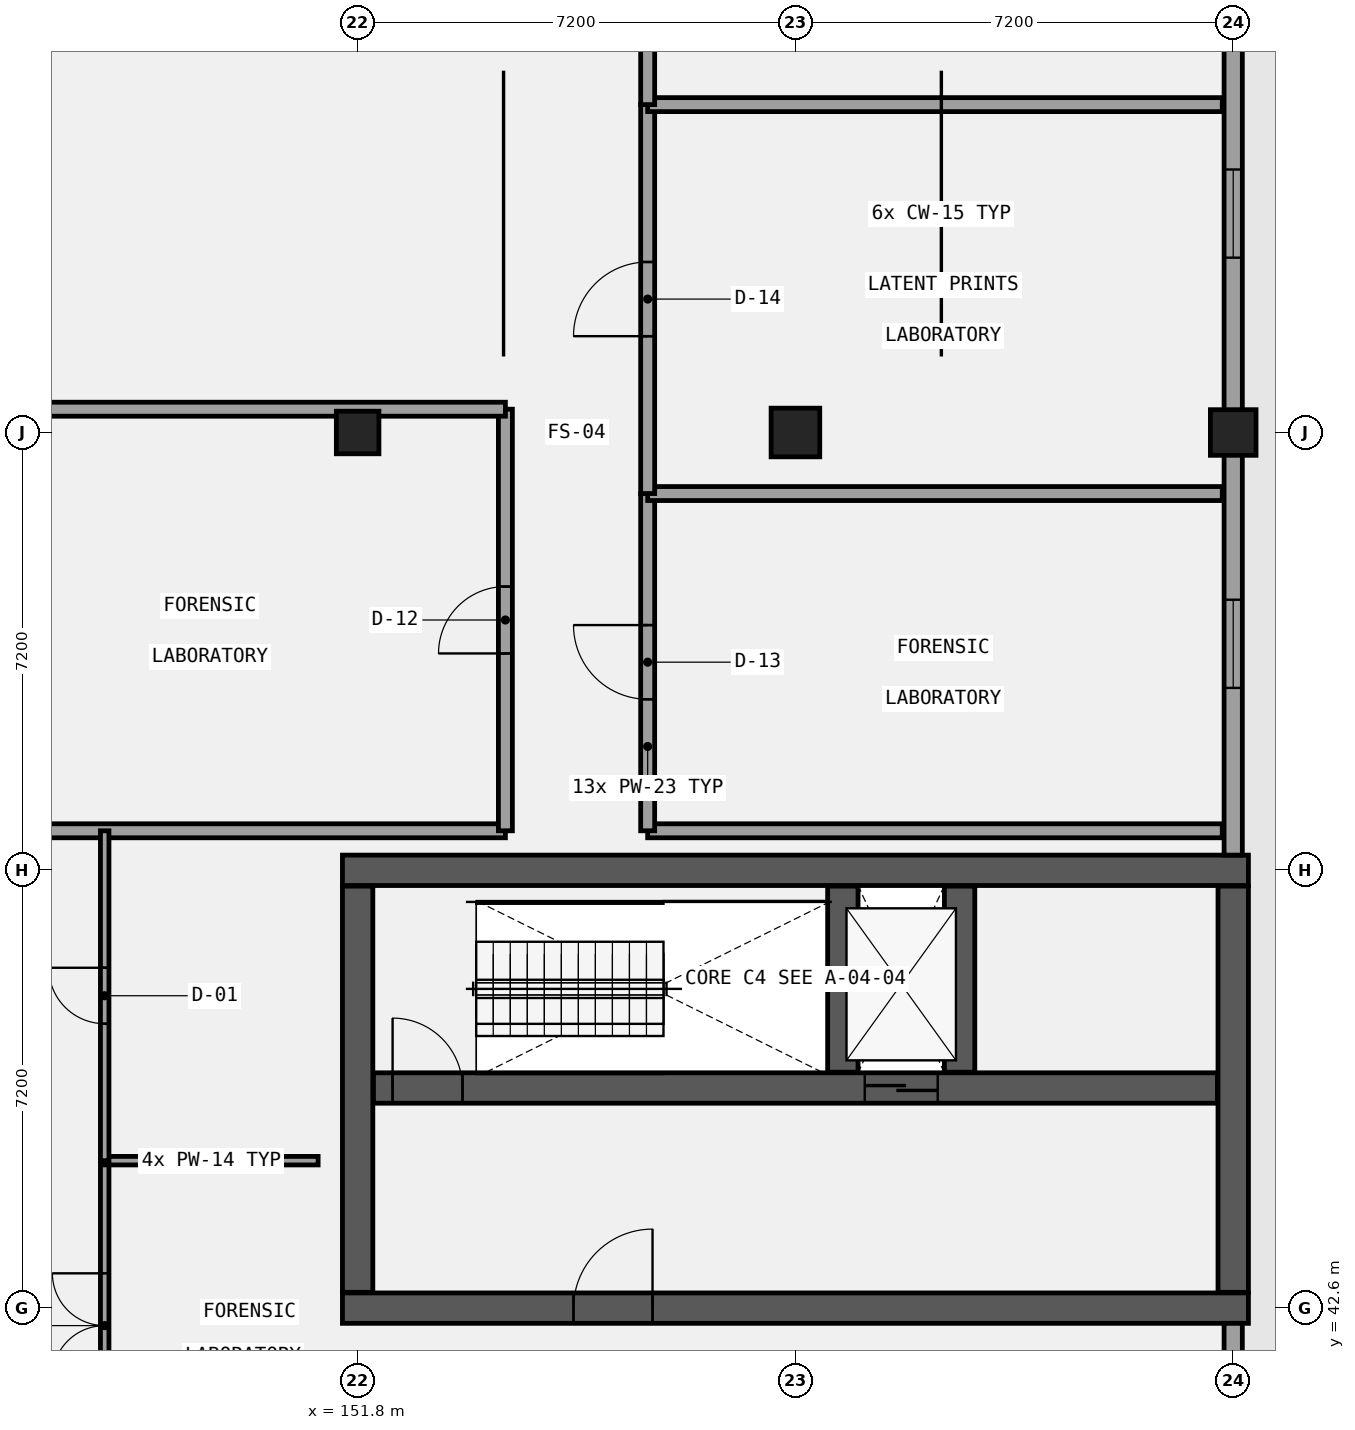
"""IFC4 building model, lengths in metres.
Left out: names, types, materials, properties, quantities, classifications, styles, units other than length and angle.
Written with IfcOpenShell. Run it as: python <this file> out.ifc"""

import sys

from ifc_helpers import new_model, si_unit, direction, frame, frame_2d, origin, origin_2d, place, context, subcontext, project, spatial, rectangle, extrude, element, fill, save


model = new_model("IFC4")
c1 = context("Model", 3, precision=1e-05, world=origin(), true_north=direction((0.0, 1.0)))
c2 = subcontext(c1, "Body", "Model", "MODEL_VIEW")
j1 = project(units=[si_unit("LENGTHUNIT", "METRE"), si_unit("PLANEANGLEUNIT", "RADIAN")], contexts=[c1])
p1 = place(None, origin())
s1 = spatial("IfcSite", under=j1, at=p1, CompositionType="ELEMENT")
p2 = place(p1, origin())
s2 = spatial("IfcBuilding", under=s1, at=p2, CompositionType="ELEMENT")
p3 = place(p2, frame((0.0, 0.0, 5.4)))
s3 = spatial("IfcBuildingStorey", under=s2, at=p3, CompositionType="ELEMENT", Elevation=5.4)
p4 = place(p3, frame((151.55, 49.8, 0.0), z_axis=(0.0, 0.0, 1.0), x_axis=(1.0, 0.0, 0.0)))
e1 = element("IfcWall", 1, at=p4, inside=s3, PredefinedType="SHEAR", context=c2, shape_type="SweptSolid", body=[
    extrude(rectangle(XDim=14.9, YDim=0.5, at=frame_2d((7.45, 0.0))), origin(), (0.0, 0.0, 1.0), 4.2),
])
p5 = place(p3, frame((151.55, 42.6, 0.0), z_axis=(0.0, 0.0, 1.0), x_axis=(1.0, 0.0, 0.0)))
e2 = element("IfcWall", 2, at=p5, inside=s3, PredefinedType="SHEAR", context=c2, shape_type="SweptSolid", body=[
    extrude(rectangle(XDim=14.9, YDim=0.5, at=frame_2d((7.45, 0.0))), origin(), (0.0, 0.0, 1.0), 4.2),
])
p6 = place(p5, frame((3.8, 0.0, 0.0)))
e3 = element("IfcOpeningElement", 3, at=p6, cuts=e2, PredefinedType="OPENING", context=c2, shape_type="SweptSolid", body=[
    extrude(rectangle(XDim=1.3, YDim=2.2, at=frame_2d((0.65, 1.1))), frame((0.0, 0.26, 0.0), z_axis=(0.0, -1.0, 0.0), x_axis=(1.0, 0.0, 0.0)), (0.0, 0.0, 1.0), 0.52),
])
for number, where, z_axis, x_axis in (
    (4, (151.8, 42.86, 0.0), (0.0, 0.0, 1.0), (0.0, 1.0, 0.0)),
    (5, (166.2, 42.86, 0.0), (0.0, 0.0, 1.0), (0.0, 1.0, 0.0)),
):
    element("IfcWall", number, at=place(p3, frame(where, z_axis=z_axis, x_axis=x_axis)), inside=s3, PredefinedType="SHEAR", context=c2, shape_type="SweptSolid", body=[
        extrude(rectangle(XDim=6.68, YDim=0.5, at=frame_2d((3.34, 0.0))), origin(), (0.0, 0.0, 1.0), 4.2),
    ])
p7 = place(p3, frame((152.06, 46.22, 0.0), z_axis=(0.0, 0.0, 1.0), x_axis=(1.0, 0.0, 0.0)))
e6 = element("IfcWall", 6, at=p7, inside=s3, PredefinedType="SHEAR", context=c2, shape_type="SweptSolid", body=[
    extrude(rectangle(XDim=13.88, YDim=0.5, at=frame_2d((6.94, 0.0))), origin(), (0.0, 0.0, 1.0), 4.2),
])
p8 = place(p7, frame((8.08, 0.0, 0.0)))
e7 = element("IfcOpeningElement", 7, at=p8, cuts=e6, PredefinedType="OPENING", context=c2, shape_type="SweptSolid", body=[
    extrude(rectangle(XDim=1.2, YDim=2.15, at=frame_2d((0.6, 1.075))), frame((0.0, 0.26, 0.0), z_axis=(0.0, -1.0, 0.0), x_axis=(1.0, 0.0, 0.0)), (0.0, 0.0, 1.0), 0.52),
])
p9 = place(p7, frame((0.315, 0.0, 0.0)))
e8 = element("IfcOpeningElement", 8, at=p9, cuts=e6, PredefinedType="OPENING", context=c2, shape_type="SweptSolid", body=[
    extrude(rectangle(XDim=1.15, YDim=2.15, at=frame_2d((0.575, 1.075))), frame((0.0, 0.26, 0.0), z_axis=(0.0, -1.0, 0.0), x_axis=(1.0, 0.0, 0.0)), (0.0, 0.0, 1.0), 0.52),
])
for number, where, z_axis, x_axis in (
    (9, (159.78, 46.48, 0.0), (0.0, 0.0, 1.0), (0.0, 1.0, 0.0)),
    (10, (161.7, 46.48, 0.0), (0.0, 0.0, 1.0), (0.0, 1.0, 0.0)),
):
    element("IfcWall", number, at=place(p3, frame(where, z_axis=z_axis, x_axis=x_axis)), inside=s3, PredefinedType="SHEAR", context=c2, shape_type="SweptSolid", body=[
        extrude(rectangle(XDim=3.06, YDim=0.5, at=frame_2d((1.53, 0.0))), origin(), (0.0, 0.0, 1.0), 4.2),
    ])
p10 = place(p3, frame((151.8, 57.0, 0.0), z_axis=(0.0, 0.0, 1.0), x_axis=(1.0, 0.0, 0.0)))
e11 = element("IfcColumn", 11, at=p10, inside=s3, PredefinedType="COLUMN", context=c2, shape_type="SweptSolid", body=[
    extrude(rectangle(XDim=0.7, YDim=0.7, at=origin_2d()), origin(), (0.0, 0.0, 1.0), 4.2),
])
p11 = place(p3, frame((159.0, 57.0, 0.0), z_axis=(0.0, 0.0, 1.0), x_axis=(1.0, 0.0, 0.0)))
e12 = element("IfcColumn", 12, at=p11, inside=s3, PredefinedType="COLUMN", context=c2, shape_type="SweptSolid", body=[
    extrude(rectangle(XDim=0.8, YDim=0.8, at=origin_2d()), origin(), (0.0, 0.0, 1.0), 4.2),
])
p12 = place(p3, frame((166.2, 57.0, 0.0), z_axis=(0.0, 0.0, 1.0), x_axis=(1.0, 0.0, 0.0)))
e13 = element("IfcColumn", 13, at=p12, inside=s3, PredefinedType="COLUMN", context=c2, shape_type="SweptSolid", body=[
    extrude(rectangle(XDim=0.75, YDim=0.75, at=origin_2d()), origin(), (0.0, 0.0, 1.0), 4.2),
])
p13 = place(p3, frame((166.2, 21.15, 0.0), z_axis=(0.0, 0.0, 1.0), x_axis=(0.0, 1.0, 0.0)))
e14 = element("IfcWall", 14, at=p13, inside=s3, PredefinedType="SOLIDWALL", context=c2, shape_type="SweptSolid", body=[
    extrude(rectangle(XDim=21.2, YDim=0.3, at=frame_2d((10.6, 0.0))), origin(), (0.0, 0.0, 1.0), 3.02),
])
p14 = place(p13, frame((2.625, 0.0, 1.0)))
e15 = element("IfcOpeningElement", 15, at=p14, cuts=e14, PredefinedType="OPENING", context=c2, shape_type="SweptSolid", body=[
    extrude(rectangle(XDim=1.8, YDim=1.65, at=frame_2d((0.9, 0.825))), frame((0.0, 0.16, 0.0), z_axis=(0.0, -1.0, 0.0), x_axis=(1.0, 0.0, 0.0)), (0.0, 0.0, 1.0), 0.32),
])
p15 = place(p13, frame((9.75, 0.0, 1.0)))
e16 = element("IfcOpeningElement", 16, at=p15, cuts=e14, PredefinedType="OPENING", context=c2, shape_type="SweptSolid", body=[
    extrude(rectangle(XDim=1.8, YDim=1.65, at=frame_2d((0.9, 0.825))), frame((0.0, 0.16, 0.0), z_axis=(0.0, -1.0, 0.0), x_axis=(1.0, 0.0, 0.0)), (0.0, 0.0, 1.0), 0.32),
])
p16 = place(p13, frame((16.825, 0.0, 1.0)))
e17 = element("IfcOpeningElement", 17, at=p16, cuts=e14, PredefinedType="OPENING", context=c2, shape_type="SweptSolid", body=[
    extrude(rectangle(XDim=1.8, YDim=1.65, at=frame_2d((0.9, 0.825))), frame((0.0, 0.16, 0.0), z_axis=(0.0, -1.0, 0.0), x_axis=(1.0, 0.0, 0.0)), (0.0, 0.0, 1.0), 0.32),
])
p17 = place(p3, frame((166.2, 50.05, 0.0), z_axis=(0.0, 0.0, 1.0), x_axis=(0.0, 1.0, 0.0)))
e18 = element("IfcWall", 18, at=p17, inside=s3, PredefinedType="SOLIDWALL", context=c2, shape_type="SweptSolid", body=[
    extrude(rectangle(XDim=28.4, YDim=0.3, at=frame_2d((14.2, 0.0))), origin(), (0.0, 0.0, 1.0), 3.17),
])
p18 = place(p17, frame((2.75, 0.0, 1.0)))
e19 = element("IfcOpeningElement", 19, at=p18, cuts=e18, PredefinedType="OPENING", context=c2, shape_type="SweptSolid", body=[
    extrude(rectangle(XDim=1.45, YDim=1.65, at=frame_2d((0.725, 0.825))), frame((0.0, 0.16, 0.0), z_axis=(0.0, -1.0, 0.0), x_axis=(1.0, 0.0, 0.0)), (0.0, 0.0, 1.0), 0.32),
])
p19 = place(p17, frame((9.825, 0.0, 1.0)))
e20 = element("IfcOpeningElement", 20, at=p19, cuts=e18, PredefinedType="OPENING", context=c2, shape_type="SweptSolid", body=[
    extrude(rectangle(XDim=1.45, YDim=1.65, at=frame_2d((0.725, 0.825))), frame((0.0, 0.16, 0.0), z_axis=(0.0, -1.0, 0.0), x_axis=(1.0, 0.0, 0.0)), (0.0, 0.0, 1.0), 0.32),
])
p20 = place(p17, frame((17.025, 0.0, 1.0)))
e21 = element("IfcOpeningElement", 21, at=p20, cuts=e18, PredefinedType="OPENING", context=c2, shape_type="SweptSolid", body=[
    extrude(rectangle(XDim=1.45, YDim=1.65, at=frame_2d((0.725, 0.825))), frame((0.0, 0.16, 0.0), z_axis=(0.0, -1.0, 0.0), x_axis=(1.0, 0.0, 0.0)), (0.0, 0.0, 1.0), 0.32),
])
p21 = place(p17, frame((24.15, 0.0, 1.0)))
e22 = element("IfcOpeningElement", 22, at=p21, cuts=e18, PredefinedType="OPENING", context=c2, shape_type="SweptSolid", body=[
    extrude(rectangle(XDim=1.45, YDim=1.65, at=frame_2d((0.725, 0.825))), frame((0.0, 0.16, 0.0), z_axis=(0.0, -1.0, 0.0), x_axis=(1.0, 0.0, 0.0)), (0.0, 0.0, 1.0), 0.32),
])
p22 = place(p3, frame((144.78, 50.45, 0.0), z_axis=(0.0, 0.0, 1.0), x_axis=(1.0, 0.0, 0.0)))
e23 = element("IfcWall", 23, at=p22, inside=s3, PredefinedType="PARTITIONING", context=c2, shape_type="SweptSolid", body=[
    extrude(rectangle(XDim=9.45, YDim=0.23, at=frame_2d((4.725, 0.0))), origin(), (0.0, 0.0, 1.0), 3.92),
])
p23 = place(p3, frame((154.23, 50.45, 0.0), z_axis=(0.0, 0.0, 1.0), x_axis=(0.0, 1.0, 0.0)))
e24 = element("IfcWall", 24, at=p23, inside=s3, PredefinedType="PARTITIONING", context=c2, shape_type="SweptSolid", body=[
    extrude(rectangle(XDim=6.933, YDim=0.23, at=frame_2d((3.467, 0.0))), origin(), (0.0, 0.0, 1.0), 3.92),
])
p24 = place(p23, frame((2.917, 0.0, 0.0)))
e25 = element("IfcOpeningElement", 25, at=p24, cuts=e24, PredefinedType="OPENING", context=c2, shape_type="SweptSolid", body=[
    extrude(rectangle(XDim=1.1, YDim=2.35, at=frame_2d((0.55, 1.175))), frame((0.0, 0.125, 0.0), z_axis=(0.0, -1.0, 0.0), x_axis=(1.0, 0.0, 0.0)), (0.0, 0.0, 1.0), 0.25),
])
p25 = place(p3, frame((144.78, 57.383, 0.0), z_axis=(0.0, 0.0, 1.0), x_axis=(1.0, 0.0, 0.0)))
e26 = element("IfcWall", 26, at=p25, inside=s3, PredefinedType="PARTITIONING", context=c2, shape_type="SweptSolid", body=[
    extrude(rectangle(XDim=9.45, YDim=0.23, at=frame_2d((4.725, 0.0))), origin(), (0.0, 0.0, 1.0), 3.12),
])
p26 = place(p3, frame((156.57, 50.45, 0.0), z_axis=(0.0, 0.0, 1.0), x_axis=(1.0, 0.0, 0.0)))
e27 = element("IfcWall", 27, at=p26, inside=s3, PredefinedType="PARTITIONING", context=c2, shape_type="SweptSolid", body=[
    extrude(rectangle(XDim=9.45, YDim=0.23, at=frame_2d((4.725, 0.0))), origin(), (0.0, 0.0, 1.0), 3.92),
])
p27 = place(p3, frame((156.57, 50.45, 0.0), z_axis=(0.0, 0.0, 1.0), x_axis=(0.0, 1.0, 0.0)))
e28 = element("IfcWall", 28, at=p27, inside=s3, PredefinedType="PARTITIONING", context=c2, shape_type="SweptSolid", body=[
    extrude(rectangle(XDim=5.546, YDim=0.23, at=frame_2d((2.773, 0.0))), origin(), (0.0, 0.0, 1.0), 3.92),
])
p28 = place(p27, frame((2.163, 0.0, 0.0)))
e29 = element("IfcOpeningElement", 29, at=p28, cuts=e28, PredefinedType="OPENING", context=c2, shape_type="SweptSolid", body=[
    extrude(rectangle(XDim=1.22, YDim=2.1, at=frame_2d((0.61, 1.05))), frame((0.0, 0.125, 0.0), z_axis=(0.0, -1.0, 0.0), x_axis=(1.0, 0.0, 0.0)), (0.0, 0.0, 1.0), 0.25),
])
p29 = place(p3, frame((156.57, 55.996, 0.0), z_axis=(0.0, 0.0, 1.0), x_axis=(1.0, 0.0, 0.0)))
e30 = element("IfcWall", 30, at=p29, inside=s3, PredefinedType="PARTITIONING", context=c2, shape_type="SweptSolid", body=[
    extrude(rectangle(XDim=9.45, YDim=0.23, at=frame_2d((4.725, 0.0))), origin(), (0.0, 0.0, 1.0), 3.92),
])
p30 = place(p3, frame((156.57, 55.996, 0.0), z_axis=(0.0, 0.0, 1.0), x_axis=(0.0, 1.0, 0.0)))
e31 = element("IfcWall", 31, at=p30, inside=s3, PredefinedType="PARTITIONING", context=c2, shape_type="SweptSolid", body=[
    extrude(rectangle(XDim=6.396, YDim=0.23, at=frame_2d((3.198, 0.0))), origin(), (0.0, 0.0, 1.0), 3.92),
])
p31 = place(p30, frame((2.588, 0.0, 0.0)))
e32 = element("IfcOpeningElement", 32, at=p31, cuts=e31, PredefinedType="OPENING", context=c2, shape_type="SweptSolid", body=[
    extrude(rectangle(XDim=1.22, YDim=2.22, at=frame_2d((0.61, 1.11))), frame((0.0, 0.125, 0.0), z_axis=(0.0, -1.0, 0.0), x_axis=(1.0, 0.0, 0.0)), (0.0, 0.0, 1.0), 0.25),
])
p32 = place(p3, frame((156.57, 62.392, 0.0), z_axis=(0.0, 0.0, 1.0), x_axis=(1.0, 0.0, 0.0)))
e33 = element("IfcWall", 33, at=p32, inside=s3, PredefinedType="PARTITIONING", context=c2, shape_type="SweptSolid", body=[
    extrude(rectangle(XDim=9.45, YDim=0.23, at=frame_2d((4.725, 0.0))), origin(), (0.0, 0.0, 1.0), 3.37),
])
p33 = place(p3, frame((156.57, 62.392, 0.0), z_axis=(0.0, 0.0, 1.0), x_axis=(0.0, 1.0, 0.0)))
e34 = element("IfcWall", 34, at=p33, inside=s3, PredefinedType="PARTITIONING", context=c2, shape_type="SweptSolid", body=[
    extrude(rectangle(XDim=10.242, YDim=0.23, at=frame_2d((5.121, 0.0))), origin(), (0.0, 0.0, 1.0), 3.92),
])
p34 = place(p33, frame((4.511, 0.0, 0.0)))
e35 = element("IfcOpeningElement", 35, at=p34, cuts=e34, PredefinedType="OPENING", context=c2, shape_type="SweptSolid", body=[
    extrude(rectangle(XDim=1.22, YDim=2.35, at=frame_2d((0.61, 1.175))), frame((0.0, 0.125, 0.0), z_axis=(0.0, -1.0, 0.0), x_axis=(1.0, 0.0, 0.0)), (0.0, 0.0, 1.0), 0.25),
])
p35 = place(p3, frame((147.64, 39.6, 0.0), z_axis=(0.0, 0.0, 1.0), x_axis=(0.0, 1.0, 0.0)))
e36 = element("IfcWall", 36, at=p35, inside=s3, PredefinedType="PARTITIONING", context=c2, shape_type="SweptSolid", body=[
    extrude(rectangle(XDim=5.425, YDim=0.14, at=frame_2d((2.712, 0.0))), origin(), (0.0, 0.0, 1.0), 3.92),
])
p36 = place(p35, frame((1.853, 0.0, 0.0)))
e37 = element("IfcOpeningElement", 37, at=p36, cuts=e36, PredefinedType="OPENING", context=c2, shape_type="SweptSolid", body=[
    extrude(rectangle(XDim=1.72, YDim=2.35, at=frame_2d((0.86, 1.175))), frame((0.0, 0.08, 0.0), z_axis=(0.0, -1.0, 0.0), x_axis=(1.0, 0.0, 0.0)), (0.0, 0.0, 1.0), 0.16),
])
p37 = place(p3, frame((147.64, 45.025, 0.0), z_axis=(0.0, 0.0, 1.0), x_axis=(1.0, 0.0, 0.0)))
e38 = element("IfcWall", 38, at=p37, inside=s3, PredefinedType="PARTITIONING", context=c2, shape_type="SweptSolid", body=[
    extrude(rectangle(XDim=3.51, YDim=0.14, at=frame_2d((1.755, 0.0))), origin(), (0.0, 0.0, 1.0), 3.92),
])
p38 = place(p3, frame((147.64, 45.025, 0.0), z_axis=(0.0, 0.0, 1.0), x_axis=(0.0, 1.0, 0.0)))
e39 = element("IfcWall", 39, at=p38, inside=s3, PredefinedType="PARTITIONING", context=c2, shape_type="SweptSolid", body=[
    extrude(rectangle(XDim=5.425, YDim=0.14, at=frame_2d((2.712, 0.0))), origin(), (0.0, 0.0, 1.0), 3.92),
])
p39 = place(p38, frame((2.252, 0.0, 0.0)))
e40 = element("IfcOpeningElement", 40, at=p39, cuts=e39, PredefinedType="OPENING", context=c2, shape_type="SweptSolid", body=[
    extrude(rectangle(XDim=0.92, YDim=2.1, at=frame_2d((0.46, 1.05))), frame((0.0, 0.08, 0.0), z_axis=(0.0, -1.0, 0.0), x_axis=(1.0, 0.0, 0.0)), (0.0, 0.0, 1.0), 0.16),
])
p40 = place(p8, frame((1.2, 0.0, 0.0), z_axis=(0.0, 0.0, 1.0), x_axis=(-1.0, 0.0, 0.0)))
e41 = element("IfcDoor", 41, at=p40, inside=s3, OperationType="DOUBLE_DOOR_SLIDING", PredefinedType="DOOR", context=c2, shape_type="SweptSolid", body=[
    extrude(rectangle(XDim=1.2, YDim=2.15, at=frame_2d((0.6, 1.075))), frame((0.0, 0.025, 0.0), z_axis=(0.0, -1.0, 0.0), x_axis=(1.0, 0.0, 0.0)), (0.0, 0.0, 1.0), 0.05),
])
fill(e7, e41)
p41 = place(p9, origin())
e42 = element("IfcDoor", 42, at=p41, inside=s3, OperationType="SINGLE_SWING_LEFT", PredefinedType="DOOR", context=c2, shape_type="SweptSolid", body=[
    extrude(rectangle(XDim=1.15, YDim=2.15, at=frame_2d((0.575, 1.075))), frame((0.0, 0.025, 0.0), z_axis=(0.0, -1.0, 0.0), x_axis=(1.0, 0.0, 0.0)), (0.0, 0.0, 1.0), 0.05),
])
fill(e8, e42)
p42 = place(p6, frame((1.3, 0.0, 0.0), z_axis=(0.0, 0.0, 1.0), x_axis=(-1.0, 0.0, 0.0)))
e43 = element("IfcDoor", 43, at=p42, inside=s3, OperationType="SINGLE_SWING_RIGHT", PredefinedType="DOOR", context=c2, shape_type="SweptSolid", body=[
    extrude(rectangle(XDim=1.3, YDim=2.2, at=frame_2d((0.65, 1.1))), frame((0.0, 0.025, 0.0), z_axis=(0.0, -1.0, 0.0), x_axis=(1.0, 0.0, 0.0)), (0.0, 0.0, 1.0), 0.05),
])
fill(e3, e43)
p43 = place(p18, origin())
e44 = element("IfcWindow", 44, at=p43, inside=s3, PartitioningType="SINGLE_PANEL", PredefinedType="WINDOW", context=c2, shape_type="SweptSolid", body=[
    extrude(rectangle(XDim=1.45, YDim=1.65, at=frame_2d((0.725, 0.825))), frame((0.0, 0.03, 0.0), z_axis=(0.0, -1.0, 0.0), x_axis=(1.0, 0.0, 0.0)), (0.0, 0.0, 1.0), 0.06),
])
fill(e19, e44)
p44 = place(p19, origin())
e45 = element("IfcWindow", 45, at=p44, inside=s3, PartitioningType="SINGLE_PANEL", PredefinedType="WINDOW", context=c2, shape_type="SweptSolid", body=[
    extrude(rectangle(XDim=1.45, YDim=1.65, at=frame_2d((0.725, 0.825))), frame((0.0, 0.03, 0.0), z_axis=(0.0, -1.0, 0.0), x_axis=(1.0, 0.0, 0.0)), (0.0, 0.0, 1.0), 0.06),
])
fill(e20, e45)
p45 = place(p24, frame((1.1, 0.0, 0.0), z_axis=(0.0, 0.0, 1.0), x_axis=(-1.0, 0.0, 0.0)))
e46 = element("IfcDoor", 46, at=p45, inside=s3, OperationType="SINGLE_SWING_LEFT", PredefinedType="DOOR", context=c2, shape_type="SweptSolid", body=[
    extrude(rectangle(XDim=1.1, YDim=2.35, at=frame_2d((0.55, 1.175))), frame((0.0, 0.025, 0.0), z_axis=(0.0, -1.0, 0.0), x_axis=(1.0, 0.0, 0.0)), (0.0, 0.0, 1.0), 0.05),
])
fill(e25, e46)
p46 = place(p28, origin())
e47 = element("IfcDoor", 47, at=p46, inside=s3, OperationType="SINGLE_SWING_RIGHT", PredefinedType="DOOR", context=c2, shape_type="SweptSolid", body=[
    extrude(rectangle(XDim=1.22, YDim=2.1, at=frame_2d((0.61, 1.05))), frame((0.0, 0.025, 0.0), z_axis=(0.0, -1.0, 0.0), x_axis=(1.0, 0.0, 0.0)), (0.0, 0.0, 1.0), 0.05),
])
fill(e29, e47)
p47 = place(p31, origin())
e48 = element("IfcDoor", 48, at=p47, inside=s3, OperationType="SINGLE_SWING_LEFT", PredefinedType="DOOR", context=c2, shape_type="SweptSolid", body=[
    extrude(rectangle(XDim=1.22, YDim=2.22, at=frame_2d((0.61, 1.11))), frame((0.0, 0.025, 0.0), z_axis=(0.0, -1.0, 0.0), x_axis=(1.0, 0.0, 0.0)), (0.0, 0.0, 1.0), 0.05),
])
fill(e32, e48)
p48 = place(p36, origin())
e49 = element("IfcDoor", 49, at=p48, inside=s3, OperationType="DOUBLE_DOOR_SINGLE_SWING", PredefinedType="DOOR", context=c2, shape_type="SweptSolid", body=[
    extrude(rectangle(XDim=1.72, YDim=2.35, at=frame_2d((0.86, 1.175))), frame((0.0, 0.025, 0.0), z_axis=(0.0, -1.0, 0.0), x_axis=(1.0, 0.0, 0.0)), (0.0, 0.0, 1.0), 0.05),
])
fill(e37, e49)
p49 = place(p39, origin())
e50 = element("IfcDoor", 50, at=p49, inside=s3, OperationType="SINGLE_SWING_RIGHT", PredefinedType="DOOR", context=c2, shape_type="SweptSolid", body=[
    extrude(rectangle(XDim=0.92, YDim=2.1, at=frame_2d((0.46, 1.05))), frame((0.0, 0.025, 0.0), z_axis=(0.0, -1.0, 0.0), x_axis=(1.0, 0.0, 0.0)), (0.0, 0.0, 1.0), 0.05),
])
fill(e40, e50)
save(model, sys.argv[1])
